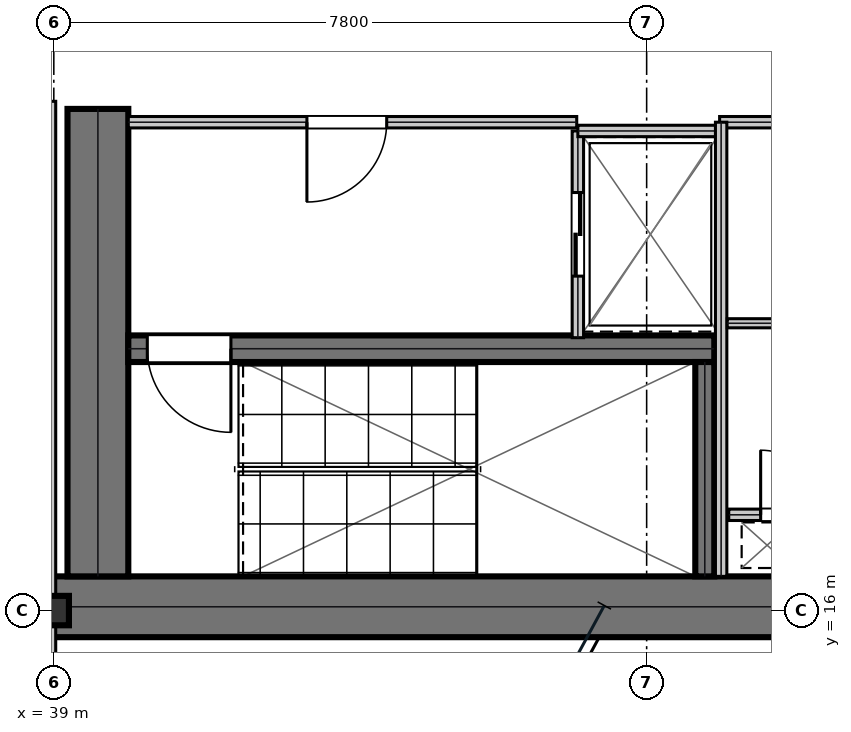
"""IFC4 building model, lengths in metres.
Left out: names, types, materials, properties, quantities, classifications, styles, units other than length and angle.
Written with IfcOpenShell. Run it as: python <this file> out.ifc"""

import sys

from ifc_helpers import new_model, si_unit, direction, frame, frame_2d, origin, origin_2d, place, context, subcontext, project, spatial, rectangle, i_section, extrude, element, fill, save


model = new_model("IFC4")
c1 = context("Model", 3, precision=1e-05, world=origin(), true_north=direction((0.0, 1.0)))
c2 = subcontext(c1, "Body", "Model", "MODEL_VIEW")
j1 = project(units=[si_unit("LENGTHUNIT", "METRE"), si_unit("PLANEANGLEUNIT", "RADIAN")], contexts=[c1])
p1 = place(None, origin())
s1 = spatial("IfcSite", under=j1, at=p1, CompositionType="ELEMENT")
p2 = place(p1, origin())
s2 = spatial("IfcBuilding", under=s1, at=p2, CompositionType="ELEMENT")
p3 = place(p2, frame((0.0, 0.0, 153.3)))
s3 = spatial("IfcBuildingStorey", under=s2, at=p3, CompositionType="ELEMENT", Elevation=153.3)
p4 = place(p3, frame((38.8, 16.05, 0.0), z_axis=(0.0, 0.0, 1.0), x_axis=(1.0, 0.0, 0.0)))
e1 = element("IfcWall", 1, at=p4, inside=s3, PredefinedType="SHEAR", context=c2, shape_type="SweptSolid", body=[
    extrude(rectangle(XDim=16.0, YDim=0.8, at=frame_2d((8.0, 0.0))), origin(), (0.0, 0.0, 1.0), 3.81),
])
p5 = place(p3, frame((39.58, 16.45, 0.0), z_axis=(0.0, 0.0, 1.0), x_axis=(0.0, 1.0, 0.0)))
e2 = element("IfcWall", 2, at=p5, inside=s3, PredefinedType="SHEAR", context=c2, shape_type="SweptSolid", body=[
    extrude(rectangle(XDim=6.15, YDim=0.8, at=frame_2d((3.075, 0.0))), origin(), (0.0, 0.0, 1.0), 3.81),
])
p6 = place(p3, frame((39.98, 19.445, 0.0), z_axis=(0.0, 0.0, 1.0), x_axis=(1.0, 0.0, 0.0)))
e3 = element("IfcWall", 3, at=p6, inside=s3, PredefinedType="SHEAR", context=c2, shape_type="SweptSolid", body=[
    extrude(rectangle(XDim=7.71, YDim=0.35, at=frame_2d((3.855, 0.0))), origin(), (0.0, 0.0, 1.0), 3.81),
])
p7 = place(p6, frame((0.25, 0.0, 0.0)))
e4 = element("IfcOpeningElement", 4, at=p7, cuts=e3, PredefinedType="OPENING", context=c2, shape_type="SweptSolid", body=[
    extrude(rectangle(XDim=1.1, YDim=2.15, at=frame_2d((0.55, 1.075))), frame((0.0, 0.185, 0.0), z_axis=(0.0, -1.0, 0.0), x_axis=(1.0, 0.0, 0.0)), (0.0, 0.0, 1.0), 0.37),
])
p8 = place(p3, frame((47.565, 16.45, 0.0), z_axis=(0.0, 0.0, 1.0), x_axis=(0.0, 1.0, 0.0)))
e5 = element("IfcWall", 5, at=p8, inside=s3, PredefinedType="SHEAR", context=c2, shape_type="SweptSolid", body=[
    extrude(rectangle(XDim=2.82, YDim=0.25, at=frame_2d((1.41, 0.0))), origin(), (0.0, 0.0, 1.0), 3.81),
])
p9 = place(p3, frame((39.0, 16.0, 0.0), z_axis=(0.0, 0.0, 1.0), x_axis=(1.0, 0.0, 0.0)))
e6 = element("IfcColumn", 6, at=p9, inside=s3, PredefinedType="COLUMN", context=c2, shape_type="SweptSolid", body=[
    extrude(i_section(OverallWidth=0.398, OverallDepth=0.387, WebThickness=0.021, FlangeThickness=0.033, at=origin_2d()), origin(), (0.0, 0.0, 1.0), 4.044),
])
p10 = place(p3, frame((39.98, 22.425, 0.0), z_axis=(0.0, 0.0, 1.0), x_axis=(1.0, 0.0, 0.0)))
e7 = element("IfcWall", 7, at=p10, inside=s3, PredefinedType="PARTITIONING", context=c2, shape_type="SweptSolid", body=[
    extrude(rectangle(XDim=5.9, YDim=0.15, at=frame_2d((2.95, 0.0))), origin(), (0.0, 0.0, 1.0), 3.81),
])
p11 = place(p10, frame((2.35, 0.0, 0.0)))
e8 = element("IfcOpeningElement", 8, at=p11, cuts=e7, PredefinedType="OPENING", context=c2, shape_type="SweptSolid", body=[
    extrude(rectangle(XDim=1.05, YDim=2.15, at=frame_2d((0.525, 1.075))), frame((0.0, 0.085, 0.0), z_axis=(0.0, -1.0, 0.0), x_axis=(1.0, 0.0, 0.0)), (0.0, 0.0, 1.0), 0.17),
])
p12 = place(p3, frame((45.895, 19.59, 0.0), z_axis=(0.0, 0.0, 1.0), x_axis=(0.0, 1.0, 0.0)))
e9 = element("IfcWall", 9, at=p12, inside=s3, PredefinedType="PARTITIONING", context=c2, shape_type="SweptSolid", body=[
    extrude(rectangle(XDim=2.72, YDim=0.15, at=frame_2d((1.36, 0.0))), origin(), (0.0, 0.0, 1.0), 3.81),
])
p13 = place(p12, frame((0.81, 0.0, 0.0)))
e10 = element("IfcOpeningElement", 10, at=p13, cuts=e9, PredefinedType="OPENING", context=c2, shape_type="SweptSolid", body=[
    extrude(rectangle(XDim=1.1, YDim=2.15, at=frame_2d((0.55, 1.075))), frame((0.0, 0.085, 0.0), z_axis=(0.0, -1.0, 0.0), x_axis=(1.0, 0.0, 0.0)), (0.0, 0.0, 1.0), 0.17),
])
p14 = place(p3, frame((45.895, 22.31, 0.0), z_axis=(0.0, 0.0, 1.0), x_axis=(1.0, 0.0, 0.0)))
e11 = element("IfcWall", 11, at=p14, inside=s3, PredefinedType="PARTITIONING", context=c2, shape_type="SweptSolid", body=[
    extrude(rectangle(XDim=1.915, YDim=0.15, at=frame_2d((0.958, 0.0))), origin(), (0.0, 0.0, 1.0), 3.81),
])
p15 = place(p3, frame((47.88, 17.26, 0.0), z_axis=(0.0, 0.0, 1.0), x_axis=(1.0, 0.0, 0.0)))
e12 = element("IfcWall", 12, at=p15, inside=s3, PredefinedType="PARTITIONING", context=c2, shape_type="SweptSolid", body=[
    extrude(rectangle(XDim=1.72, YDim=0.15, at=frame_2d((0.86, 0.0))), origin(), (0.0, 0.0, 1.0), 3.81),
])
p16 = place(p15, frame((0.42, 0.0, 0.0)))
e13 = element("IfcOpeningElement", 13, at=p16, cuts=e12, PredefinedType="OPENING", context=c2, shape_type="SweptSolid", body=[
    extrude(rectangle(XDim=0.85, YDim=2.15, at=frame_2d((0.425, 1.075))), frame((0.0, 0.085, 0.0), z_axis=(0.0, -1.0, 0.0), x_axis=(1.0, 0.0, 0.0)), (0.0, 0.0, 1.0), 0.17),
])
p17 = place(p3, frame((47.76, 22.425, 0.0), z_axis=(0.0, 0.0, 1.0), x_axis=(1.0, 0.0, 0.0)))
e14 = element("IfcWall", 14, at=p17, inside=s3, PredefinedType="PARTITIONING", context=c2, shape_type="SweptSolid", body=[
    extrude(rectangle(XDim=1.96, YDim=0.15, at=frame_2d((0.98, 0.0))), origin(), (0.0, 0.0, 1.0), 3.81),
])
p18 = place(p3, frame((47.78, 16.45, 0.0), z_axis=(0.0, 0.0, 1.0), x_axis=(0.0, 1.0, 0.0)))
e15 = element("IfcWall", 15, at=p18, inside=s3, PredefinedType="PARTITIONING", context=c2, shape_type="SweptSolid", body=[
    extrude(rectangle(XDim=5.975, YDim=0.15, at=frame_2d((2.988, 0.0))), origin(), (0.0, 0.0, 1.0), 3.81),
])
p19 = place(p3, frame((47.86, 19.78, 0.0), z_axis=(0.0, 0.0, 1.0), x_axis=(1.0, 0.0, 0.0)))
e16 = element("IfcWall", 16, at=p19, inside=s3, PredefinedType="PARTITIONING", context=c2, shape_type="SweptSolid", body=[
    extrude(rectangle(XDim=1.76, YDim=0.12, at=frame_2d((0.88, 0.0))), origin(), (0.0, 0.0, 1.0), 3.81),
])
p20 = place(p3, frame((38.95, 14.5, 0.0), z_axis=(0.0, 0.0, 1.0), x_axis=(0.0, 1.0, 0.0)))
e17 = element("IfcWall", 17, at=p20, inside=s3, PredefinedType="PARTITIONING", context=c2, shape_type="SweptSolid", body=[
    extrude(rectangle(XDim=8.2, YDim=0.15, at=frame_2d((4.1, 0.0))), origin(), (0.0, 0.0, 1.0), 3.19),
])
p21 = place(p11, frame((1.05, 0.0, 0.0), z_axis=(0.0, 0.0, 1.0), x_axis=(-1.0, 0.0, 0.0)))
e18 = element("IfcDoor", 18, at=p21, inside=s3, OperationType="SINGLE_SWING_RIGHT", PredefinedType="DOOR", context=c2, shape_type="SweptSolid", body=[
    extrude(rectangle(XDim=1.05, YDim=2.15, at=frame_2d((0.525, 1.075))), frame((0.0, 0.025, 0.0), z_axis=(0.0, -1.0, 0.0), x_axis=(1.0, 0.0, 0.0)), (0.0, 0.0, 1.0), 0.05),
])
fill(e8, e18)
p22 = place(p13, frame((1.1, 0.0, 0.0), z_axis=(0.0, 0.0, 1.0), x_axis=(-1.0, 0.0, 0.0)))
e19 = element("IfcDoor", 19, at=p22, inside=s3, OperationType="DOUBLE_DOOR_SLIDING", PredefinedType="DOOR", context=c2, shape_type="SweptSolid", body=[
    extrude(rectangle(XDim=1.1, YDim=2.15, at=frame_2d((0.55, 1.075))), frame((0.0, 0.025, 0.0), z_axis=(0.0, -1.0, 0.0), x_axis=(1.0, 0.0, 0.0)), (0.0, 0.0, 1.0), 0.05),
])
fill(e10, e19)
p23 = place(p16, origin())
e20 = element("IfcDoor", 20, at=p23, inside=s3, OperationType="SINGLE_SWING_LEFT", PredefinedType="TRAPDOOR", context=c2, shape_type="SweptSolid", body=[
    extrude(rectangle(XDim=0.85, YDim=2.15, at=frame_2d((0.425, 1.075))), frame((0.0, 0.025, 0.0), z_axis=(0.0, -1.0, 0.0), x_axis=(1.0, 0.0, 0.0)), (0.0, 0.0, 1.0), 0.05),
])
fill(e13, e20)
p24 = place(p7, frame((1.1, 0.0, 0.0), z_axis=(0.0, 0.0, 1.0), x_axis=(-1.0, 0.0, 0.0)))
e21 = element("IfcDoor", 21, at=p24, inside=s3, OperationType="SINGLE_SWING_LEFT", PredefinedType="DOOR", context=c2, shape_type="SweptSolid", body=[
    extrude(rectangle(XDim=1.1, YDim=2.15, at=frame_2d((0.55, 1.075))), frame((0.0, 0.025, 0.0), z_axis=(0.0, -1.0, 0.0), x_axis=(1.0, 0.0, 0.0)), (0.0, 0.0, 1.0), 0.05),
])
fill(e4, e21)
save(model, sys.argv[1])
